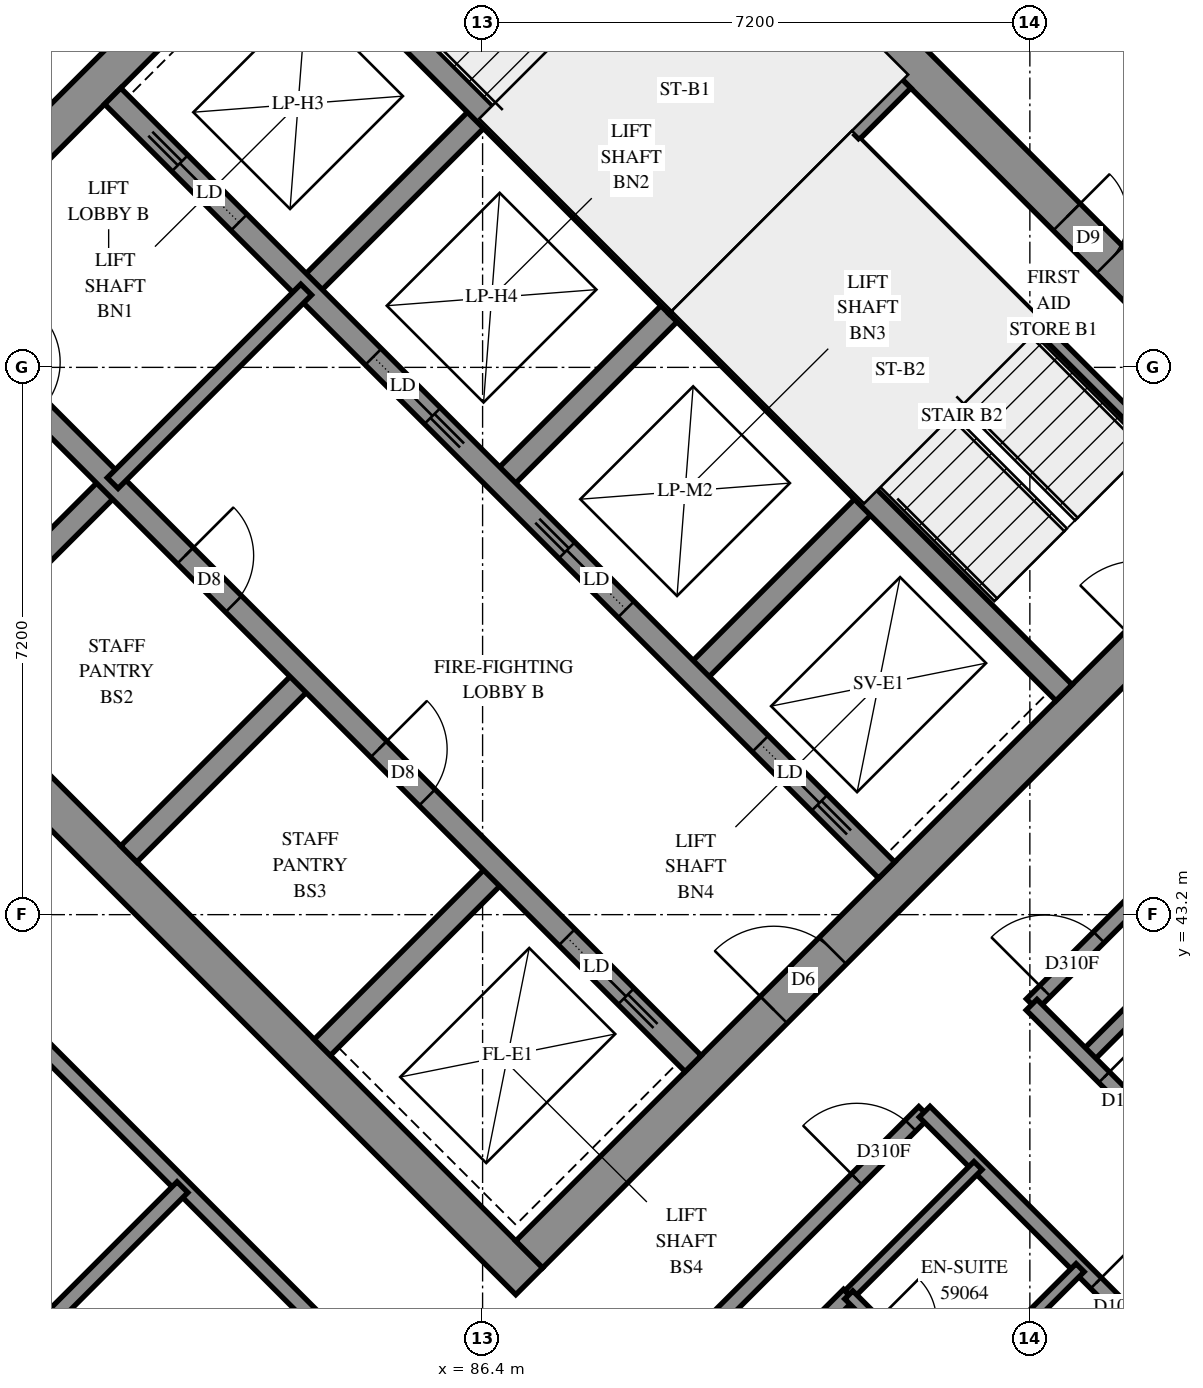
"""IFC4 building model, lengths in metres.
Left out: names, types, materials, properties, quantities, classifications, styles, units other than length and angle.
Written with IfcOpenShell. Run it as: python <this file> out.ifc"""

import sys

from ifc_helpers import new_model, si_unit, direction, frame, frame_2d, origin, place, context, subcontext, project, spatial, rectangle, extrude, element, fill, save


model = new_model("IFC4")
c1 = context("Model", 3, precision=1e-05, world=origin(), true_north=direction((0.0, 1.0)))
c2 = subcontext(c1, "Body", "Model", "MODEL_VIEW")
j1 = project(units=[si_unit("LENGTHUNIT", "METRE"), si_unit("PLANEANGLEUNIT", "RADIAN")], contexts=[c1])
p1 = place(None, origin())
s1 = spatial("IfcSite", under=j1, at=p1, CompositionType="ELEMENT")
p2 = place(p1, origin())
s2 = spatial("IfcBuilding", under=s1, at=p2, CompositionType="ELEMENT")
p3 = place(p2, frame((0.0, 0.0, 216.8)))
s3 = spatial("IfcBuildingStorey", under=s2, at=p3, CompositionType="ELEMENT", Elevation=216.8)
p4 = place(p3, frame((76.124, 49.267, -0.3), z_axis=(0.0, 0.0, 1.0), x_axis=(0.7071067812, -0.7071067812, 0.0)))
e1 = element("IfcWall", 1, at=p4, inside=s3, PredefinedType="SHEAR", context=c2, shape_type="SweptSolid", body=[
    extrude(rectangle(XDim=15.4, YDim=0.5, at=frame_2d((7.7, 0.0))), origin(), (0.0, 0.0, 1.0), 2.7),
])
p5 = place(p3, frame((86.66, 59.802, -0.3), z_axis=(0.0, 0.0, 1.0), x_axis=(0.7071067812, -0.7071067812, 0.0)))
e2 = element("IfcWall", 2, at=p5, inside=s3, PredefinedType="SHEAR", context=c2, shape_type="SweptSolid", body=[
    extrude(rectangle(XDim=15.4, YDim=0.5, at=frame_2d((7.7, 0.0))), origin(), (0.0, 0.0, 1.0), 2.7),
])
p6 = place(p5, frame((10.5, 0.0, 0.3)))
e3 = element("IfcOpeningElement", 3, at=p6, cuts=e2, PredefinedType="OPENING", context=c2, shape_type="SweptSolid", body=[
    extrude(rectangle(XDim=0.8, YDim=2.1, at=frame_2d((0.4, 1.05))), frame((0.0, 0.26, 0.0), z_axis=(0.0, -1.0, 0.0), x_axis=(1.0, 0.0, 0.0)), (0.0, 0.0, 1.0), 0.52),
])
p7 = place(p3, frame((76.478, 49.267, -0.3), z_axis=(0.0, 0.0, 1.0), x_axis=(0.7071067812, 0.7071067812, 0.0)))
e4 = element("IfcWall", 4, at=p7, inside=s3, PredefinedType="SHEAR", context=c2, shape_type="SweptSolid", body=[
    extrude(rectangle(XDim=14.4, YDim=0.5, at=frame_2d((7.2, 0.0))), origin(), (0.0, 0.0, 1.0), 2.7),
])
p8 = place(p7, frame((4.55, 0.0, 0.3)))
e5 = element("IfcOpeningElement", 5, at=p8, cuts=e4, PredefinedType="OPENING", context=c2, shape_type="SweptSolid", body=[
    extrude(rectangle(XDim=1.1, YDim=2.1, at=frame_2d((0.55, 1.05))), frame((0.0, 0.26, 0.0), z_axis=(0.0, -1.0, 0.0), x_axis=(1.0, 0.0, 0.0)), (0.0, 0.0, 1.0), 0.52),
])
p9 = place(p7, frame((11.35, 0.0, 0.3)))
e6 = element("IfcOpeningElement", 6, at=p9, cuts=e4, PredefinedType="OPENING", context=c2, shape_type="SweptSolid", body=[
    extrude(rectangle(XDim=1.1, YDim=2.1, at=frame_2d((0.55, 1.05))), frame((0.0, 0.26, 0.0), z_axis=(0.0, -1.0, 0.0), x_axis=(1.0, 0.0, 0.0)), (0.0, 0.0, 1.0), 0.52),
])
p10 = place(p3, frame((87.013, 38.731, -0.3), z_axis=(0.0, 0.0, 1.0), x_axis=(0.7071067812, 0.7071067812, 0.0)))
e7 = element("IfcWall", 7, at=p10, inside=s3, PredefinedType="SHEAR", context=c2, shape_type="SweptSolid", body=[
    extrude(rectangle(XDim=14.4, YDim=0.5, at=frame_2d((7.2, 0.0))), origin(), (0.0, 0.0, 1.0), 2.7),
])
p11 = place(p10, frame((4.55, 0.0, 0.3)))
e8 = element("IfcOpeningElement", 8, at=p11, cuts=e7, PredefinedType="OPENING", context=c2, shape_type="SweptSolid", body=[
    extrude(rectangle(XDim=1.1, YDim=2.1, at=frame_2d((0.55, 1.05))), frame((0.0, 0.26, 0.0), z_axis=(0.0, -1.0, 0.0), x_axis=(1.0, 0.0, 0.0)), (0.0, 0.0, 1.0), 0.52),
])
p12 = place(p10, frame((11.35, 0.0, 0.3)))
e9 = element("IfcOpeningElement", 9, at=p12, cuts=e7, PredefinedType="OPENING", context=c2, shape_type="SweptSolid", body=[
    extrude(rectangle(XDim=1.1, YDim=2.1, at=frame_2d((0.55, 1.05))), frame((0.0, 0.26, 0.0), z_axis=(0.0, -1.0, 0.0), x_axis=(1.0, 0.0, 0.0)), (0.0, 0.0, 1.0), 0.52),
])
for number, where, z_axis, x_axis in (
    (10, (79.2, 46.544, 0.0), (0.0, 0.0, 1.0), (0.707, 0.707, 0.0)),
    (11, (84.079, 51.423, 0.0), (0.0, 0.0, 1.0), (0.707, 0.707, 0.0)),
):
    element("IfcWall", number, at=place(p3, frame(where, z_axis=z_axis, x_axis=x_axis)), inside=s3, PredefinedType="SOLIDWALL", context=c2, shape_type="SweptSolid", body=[
        extrude(rectangle(XDim=3.3, YDim=0.3, at=frame_2d((1.65, 0.0))), origin(), (0.0, 0.0, 1.0), 3.1),
    ])
p13 = place(p3, frame((81.746, 43.999, 0.0), z_axis=(0.0, 0.0, 1.0), x_axis=(0.7071067812, 0.7071067812, 0.0)))
e12 = element("IfcWall", 12, at=p13, inside=s3, PredefinedType="SOLIDWALL", context=c2, shape_type="SweptSolid", body=[
    extrude(rectangle(XDim=3.3, YDim=0.3, at=frame_2d((1.65, 0.0))), origin(), (0.0, 0.0, 1.0), 3.1),
])
p14 = place(p3, frame((86.625, 48.878, 0.0), z_axis=(0.0, 0.0, 1.0), x_axis=(0.7071067812, 0.7071067812, 0.0)))
e13 = element("IfcWall", 13, at=p14, inside=s3, PredefinedType="SOLIDWALL", context=c2, shape_type="SweptSolid", body=[
    extrude(rectangle(XDim=3.3, YDim=0.3, at=frame_2d((1.65, 0.0))), origin(), (0.0, 0.0, 1.0), 3.1),
])
p15 = place(p3, frame((84.291, 41.453, 0.0), z_axis=(0.0, 0.0, 1.0), x_axis=(0.7071067812, 0.7071067812, 0.0)))
e14 = element("IfcWall", 14, at=p15, inside=s3, PredefinedType="SOLIDWALL", context=c2, shape_type="SweptSolid", body=[
    extrude(rectangle(XDim=3.3, YDim=0.3, at=frame_2d((1.65, 0.0))), origin(), (0.0, 0.0, 1.0), 3.1),
])
p16 = place(p3, frame((89.17, 46.332, 0.0), z_axis=(0.0, 0.0, 1.0), x_axis=(0.7071067812, 0.7071067812, 0.0)))
e15 = element("IfcWall", 15, at=p16, inside=s3, PredefinedType="SOLIDWALL", context=c2, shape_type="SweptSolid", body=[
    extrude(rectangle(XDim=3.3, YDim=0.3, at=frame_2d((1.65, 0.0))), origin(), (0.0, 0.0, 1.0), 3.1),
])
p17 = place(p3, frame((78.988, 51.423, 0.0), z_axis=(0.0, 0.0, 1.0), x_axis=(0.7071067812, -0.7071067812, 0.0)))
e16 = element("IfcWall", 16, at=p17, inside=s3, PredefinedType="SOLIDWALL", context=c2, shape_type="SweptSolid", body=[
    extrude(rectangle(XDim=14.4, YDim=0.3, at=frame_2d((7.2, 0.0))), origin(), (0.0, 0.0, 1.0), 3.1),
])
p18 = place(p17, frame((1.35, 0.0, 0.0)))
e17 = element("IfcOpeningElement", 17, at=p18, cuts=e16, PredefinedType="OPENING", context=c2, shape_type="SweptSolid", body=[
    extrude(rectangle(XDim=0.9, YDim=2.1, at=frame_2d((0.45, 1.05))), frame((0.0, 0.16, 0.0), z_axis=(0.0, -1.0, 0.0), x_axis=(1.0, 0.0, 0.0)), (0.0, 0.0, 1.0), 0.32),
])
p19 = place(p17, frame((4.95, 0.0, 0.0)))
e18 = element("IfcOpeningElement", 18, at=p19, cuts=e16, PredefinedType="OPENING", context=c2, shape_type="SweptSolid", body=[
    extrude(rectangle(XDim=0.9, YDim=2.1, at=frame_2d((0.45, 1.05))), frame((0.0, 0.16, 0.0), z_axis=(0.0, -1.0, 0.0), x_axis=(1.0, 0.0, 0.0)), (0.0, 0.0, 1.0), 0.32),
])
p20 = place(p17, frame((8.55, 0.0, 0.0)))
e19 = element("IfcOpeningElement", 19, at=p20, cuts=e16, PredefinedType="OPENING", context=c2, shape_type="SweptSolid", body=[
    extrude(rectangle(XDim=0.9, YDim=2.1, at=frame_2d((0.45, 1.05))), frame((0.0, 0.16, 0.0), z_axis=(0.0, -1.0, 0.0), x_axis=(1.0, 0.0, 0.0)), (0.0, 0.0, 1.0), 0.32),
])
p21 = place(p17, frame((12.05, 0.0, 0.0)))
e20 = element("IfcOpeningElement", 20, at=p21, cuts=e16, PredefinedType="OPENING", context=c2, shape_type="SweptSolid", body=[
    extrude(rectangle(XDim=1.1, YDim=2.1, at=frame_2d((0.55, 1.05))), frame((0.0, 0.16, 0.0), z_axis=(0.0, -1.0, 0.0), x_axis=(1.0, 0.0, 0.0)), (0.0, 0.0, 1.0), 0.32),
])
p22 = place(p3, frame((81.534, 53.969, 0.0), z_axis=(0.0, 0.0, 1.0), x_axis=(0.707103309, -0.7071102534, 0.0)))
e21 = element("IfcWall", 21, at=p22, inside=s3, PredefinedType="SOLIDWALL", context=c2, shape_type="SweptSolid", body=[
    extrude(rectangle(XDim=14.4, YDim=0.3, at=frame_2d((7.2, 0.0))), origin(), (0.0, 0.0, 1.0), 3.1),
])
p23 = place(p22, frame((1.25, 0.0, 0.0)))
e22 = element("IfcOpeningElement", 22, at=p23, cuts=e21, PredefinedType="OPENING", context=c2, shape_type="SweptSolid", body=[
    extrude(rectangle(XDim=1.1, YDim=2.1, at=frame_2d((0.55, 1.05))), frame((0.0, 0.16, 0.0), z_axis=(0.0, -1.0, 0.0), x_axis=(1.0, 0.0, 0.0)), (0.0, 0.0, 1.0), 0.32),
])
p24 = place(p22, frame((4.85, 0.0, 0.0)))
e23 = element("IfcOpeningElement", 23, at=p24, cuts=e21, PredefinedType="OPENING", context=c2, shape_type="SweptSolid", body=[
    extrude(rectangle(XDim=1.1, YDim=2.1, at=frame_2d((0.55, 1.05))), frame((0.0, 0.16, 0.0), z_axis=(0.0, -1.0, 0.0), x_axis=(1.0, 0.0, 0.0)), (0.0, 0.0, 1.0), 0.32),
])
p25 = place(p22, frame((8.45, 0.0, 0.0)))
e24 = element("IfcOpeningElement", 24, at=p25, cuts=e21, PredefinedType="OPENING", context=c2, shape_type="SweptSolid", body=[
    extrude(rectangle(XDim=1.1, YDim=2.1, at=frame_2d((0.55, 1.05))), frame((0.0, 0.16, 0.0), z_axis=(0.0, -1.0, 0.0), x_axis=(1.0, 0.0, 0.0)), (0.0, 0.0, 1.0), 0.32),
])
p26 = place(p22, frame((12.05, 0.0, 0.0)))
e25 = element("IfcOpeningElement", 25, at=p26, cuts=e21, PredefinedType="OPENING", context=c2, shape_type="SweptSolid", body=[
    extrude(rectangle(XDim=1.1, YDim=2.1, at=frame_2d((0.55, 1.05))), frame((0.0, 0.16, 0.0), z_axis=(0.0, -1.0, 0.0), x_axis=(1.0, 0.0, 0.0)), (0.0, 0.0, 1.0), 0.32),
])
for number, where, z_axis, x_axis in (
    (26, (83.867, 56.302, 0.0), (0.0, 0.0, 1.0), (0.707, -0.707, 0.0)),
    (27, (88.958, 51.211, 0.0), (0.0, 0.0, 1.0), (0.707, -0.707, 0.0)),
):
    element("IfcWall", number, at=place(p3, frame(where, z_axis=z_axis, x_axis=x_axis)), inside=s3, PredefinedType="SOLIDWALL", context=c2, shape_type="SweptSolid", body=[
        extrude(rectangle(XDim=7.2, YDim=0.3, at=frame_2d((3.6, 0.0))), origin(), (0.0, 0.0, 1.0), 3.1),
    ])
p27 = place(p3, frame((88.958, 51.211, 0.0), z_axis=(0.0, 0.0, 1.0), x_axis=(0.7071067812, 0.7071067812, 0.0)))
e28 = element("IfcWall", 28, at=p27, inside=s3, PredefinedType="SOLIDWALL", context=c2, shape_type="SweptSolid", body=[
    extrude(rectangle(XDim=4.2, YDim=0.3, at=frame_2d((2.1, 0.0))), origin(), (0.0, 0.0, 1.0), 3.1),
])
p28 = place(p3, frame((91.313, 53.354, 0.0), z_axis=(0.0, 0.0, 1.0), x_axis=(0.7071147811, -0.7070987812, 0.0)))
e29 = element("IfcWall", 29, at=p28, inside=s3, PredefinedType="PARTITIONING", context=c2, shape_type="SweptSolid", body=[
    extrude(rectangle(XDim=6.25, YDim=0.15, at=frame_2d((3.125, 0.0))), origin(), (0.0, 0.0, 1.0), 3.1),
])
p29 = place(p3, frame((81.534, 48.878, 0.0), z_axis=(0.0, 0.0, 1.0), x_axis=(0.707092892, 0.7071206701, 0.0)))
e30 = element("IfcWall", 30, at=p29, inside=s3, PredefinedType="PARTITIONING", context=c2, shape_type="SweptSolid", body=[
    extrude(rectangle(XDim=3.6, YDim=0.2, at=frame_2d((1.8, 0.0))), origin(), (0.0, 0.0, 1.0), 3.1),
])
p30 = place(p3, frame((93.625, 42.021, 0.0), z_axis=(0.0, 0.0, 1.0), x_axis=(0.7071067812, 0.7071067812, 0.0)))
e31 = element("IfcWall", 31, at=p30, inside=s3, PredefinedType="PARTITIONING", context=c2, shape_type="SweptSolid", body=[
    extrude(rectangle(XDim=9.998, YDim=0.2, at=frame_2d((4.999, 0.0))), origin(), (0.0, 0.0, 1.0), 3.1),
])
p31 = place(p30, frame((0.248, 0.0, 0.0)))
e32 = element("IfcOpeningElement", 32, at=p31, cuts=e31, PredefinedType="OPENING", context=c2, shape_type="SweptSolid", body=[
    extrude(rectangle(XDim=1.0, YDim=2.1, at=frame_2d((0.5, 1.05))), frame((0.0, 0.11, 0.0), z_axis=(0.0, -1.0, 0.0), x_axis=(1.0, 0.0, 0.0)), (0.0, 0.0, 1.0), 0.22),
])
p32 = place(p3, frame((85.01, 31.992, 0.0), z_axis=(0.0, 0.0, 1.0), x_axis=(0.7071010869, 0.7071124754, 0.0)))
e33 = element("IfcWall", 33, at=p32, inside=s3, PredefinedType="PARTITIONING", context=c2, shape_type="SweptSolid", body=[
    extrude(rectangle(XDim=8.781, YDim=0.2, at=frame_2d((4.39, 0.0))), origin(), (0.0, 0.0, 1.0), 3.1),
])
p33 = place(p3, frame((86.835, 35.231, 0.0), z_axis=(0.0, 0.0, 1.0), x_axis=(0.7071067812, 0.7071067812, 0.0)))
e34 = element("IfcWall", 34, at=p33, inside=s3, PredefinedType="PARTITIONING", context=c2, shape_type="SweptSolid", body=[
    extrude(rectangle(XDim=7.6, YDim=0.2, at=frame_2d((3.8, 0.0))), origin(), (0.0, 0.0, 1.0), 3.1),
])
p34 = place(p33, frame((6.346, 0.0, 0.0)))
e35 = element("IfcOpeningElement", 35, at=p34, cuts=e34, PredefinedType="OPENING", context=c2, shape_type="SweptSolid", body=[
    extrude(rectangle(XDim=1.0, YDim=2.1, at=frame_2d((0.5, 1.05))), frame((0.0, 0.11, 0.0), z_axis=(0.0, -1.0, 0.0), x_axis=(1.0, 0.0, 0.0)), (0.0, 0.0, 1.0), 0.22),
])
p35 = place(p3, frame((94.331, 41.313, 0.0), z_axis=(0.0, 0.0, 1.0), x_axis=(0.7072516979, 0.7069618347, 0.0)))
e36 = element("IfcWall", 36, at=p35, inside=s3, PredefinedType="PARTITIONING", context=c2, shape_type="SweptSolid", body=[
    extrude(rectangle(XDim=6.9, YDim=0.2, at=frame_2d((3.45, 0.0))), origin(), (0.0, 0.0, 1.0), 3.1),
])
p36 = place(p3, frame((80.522, 41.553, 0.0), z_axis=(0.0, 0.0, 1.0), x_axis=(0.7071067812, -0.7071067812, 0.0)))
e37 = element("IfcWall", 37, at=p36, inside=s3, PredefinedType="PARTITIONING", context=c2, shape_type="SweptSolid", body=[
    extrude(rectangle(XDim=6.836, YDim=0.2, at=frame_2d((3.418, 0.0))), origin(), (0.0, 0.0, 1.0), 3.1),
])
p37 = place(p3, frame((93.623, 42.015, 0.0), z_axis=(0.0, 0.0, 1.0), x_axis=(0.7071067812, -0.7071067812, 0.0)))
e38 = element("IfcWall", 38, at=p37, inside=s3, PredefinedType="PARTITIONING", context=c2, shape_type="SweptSolid", body=[
    extrude(rectangle(XDim=4.599, YDim=0.2, at=frame_2d((2.3, 0.0))), origin(), (0.0, 0.0, 1.0), 3.1),
])
p38 = place(p37, frame((1.349, 0.0, 0.0)))
e39 = element("IfcOpeningElement", 39, at=p38, cuts=e38, PredefinedType="OPENING", context=c2, shape_type="SweptSolid", body=[
    extrude(rectangle(XDim=0.9, YDim=2.1, at=frame_2d((0.45, 1.05))), frame((0.0, 0.11, 0.0), z_axis=(0.0, -1.0, 0.0), x_axis=(1.0, 0.0, 0.0)), (0.0, 0.0, 1.0), 0.22),
])
p39 = place(p3, frame((92.216, 40.608, 0.0), z_axis=(0.0, 0.0, 1.0), x_axis=(0.7071067812, -0.7071067812, 0.0)))
e40 = element("IfcWall", 40, at=p39, inside=s3, PredefinedType="PARTITIONING", context=c2, shape_type="SweptSolid", body=[
    extrude(rectangle(XDim=4.599, YDim=0.2, at=frame_2d((2.3, 0.0))), origin(), (0.0, 0.0, 1.0), 3.1),
])
p40 = place(p39, frame((3.189, 0.0, 0.0)))
e41 = element("IfcOpeningElement", 41, at=p40, cuts=e40, PredefinedType="OPENING", context=c2, shape_type="SweptSolid", body=[
    extrude(rectangle(XDim=0.9, YDim=2.1, at=frame_2d((0.45, 1.05))), frame((0.0, 0.11, 0.0), z_axis=(0.0, -1.0, 0.0), x_axis=(1.0, 0.0, 0.0)), (0.0, 0.0, 1.0), 0.22),
])
p41 = place(p3, frame((79.626, 36.789, 0.0), z_axis=(0.0, 0.0, 1.0), x_axis=(0.7071067812, 0.7071067812, 0.0)))
e42 = element("IfcWall", 42, at=p41, inside=s3, PredefinedType="PARTITIONING", context=c2, shape_type="SweptSolid", body=[
    extrude(rectangle(XDim=3.996, YDim=0.2, at=frame_2d((1.998, 0.0))), origin(), (0.0, 0.0, 1.0), 3.1),
])
for number, where, z_axis, x_axis in (
    (43, (92.563, 36.857, 0.0), (0.0, 0.0, 1.0), (0.707, 0.707, 0.0)),
    (44, (91.219, 38.201, 0.0), (0.0, 0.0, 1.0), (0.707, 0.707, 0.0)),
):
    element("IfcWall", number, at=place(p3, frame(where, z_axis=z_axis, x_axis=x_axis)), inside=s3, PredefinedType="PARTITIONING", context=c2, shape_type="SweptSolid", body=[
        extrude(rectangle(XDim=2.401, YDim=0.15, at=frame_2d((1.201, 0.0))), origin(), (0.0, 0.0, 1.0), 3.1),
    ])
p42 = place(p3, frame((91.217, 38.197, 0.0), z_axis=(0.0, 0.0, 1.0), x_axis=(0.7071067812, -0.7071067812, 0.0)))
e45 = element("IfcWall", 45, at=p42, inside=s3, PredefinedType="PARTITIONING", context=c2, shape_type="SweptSolid", body=[
    extrude(rectangle(XDim=1.901, YDim=0.15, at=frame_2d((0.95, 0.0))), origin(), (0.0, 0.0, 1.0), 3.1),
])
p43 = place(p42, frame((0.502, 0.0, 0.0)))
e46 = element("IfcOpeningElement", 46, at=p43, cuts=e45, PredefinedType="OPENING", context=c2, shape_type="SweptSolid", body=[
    extrude(rectangle(XDim=0.8, YDim=2.1, at=frame_2d((0.4, 1.05))), frame((0.0, 0.085, 0.0), z_axis=(0.0, -1.0, 0.0), x_axis=(1.0, 0.0, 0.0)), (0.0, 0.0, 1.0), 0.17),
])
p44 = place(p6, origin())
e47 = element("IfcDoor", 47, at=p44, inside=s3, OperationType="SINGLE_SWING_RIGHT", PredefinedType="DOOR", context=c2, shape_type="SweptSolid", body=[
    extrude(rectangle(XDim=0.8, YDim=2.1, at=frame_2d((0.4, 1.05))), frame((0.0, 0.025, 0.0), z_axis=(0.0, -1.0, 0.0), x_axis=(1.0, 0.0, 0.0)), (0.0, 0.0, 1.0), 0.05),
])
fill(e3, e47)
p45 = place(p11, origin())
e48 = element("IfcDoor", 48, at=p45, inside=s3, OperationType="DOUBLE_DOOR_SINGLE_SWING", PredefinedType="DOOR", context=c2, shape_type="SweptSolid", body=[
    extrude(rectangle(XDim=1.1, YDim=2.1, at=frame_2d((0.55, 1.05))), frame((0.0, 0.025, 0.0), z_axis=(0.0, -1.0, 0.0), x_axis=(1.0, 0.0, 0.0)), (0.0, 0.0, 1.0), 0.05),
])
fill(e8, e48)
p46 = place(p19, origin())
e49 = element("IfcDoor", 49, at=p46, inside=s3, OperationType="SINGLE_SWING_LEFT", PredefinedType="DOOR", context=c2, shape_type="SweptSolid", body=[
    extrude(rectangle(XDim=0.9, YDim=2.1, at=frame_2d((0.45, 1.05))), frame((0.0, 0.025, 0.0), z_axis=(0.0, -1.0, 0.0), x_axis=(1.0, 0.0, 0.0)), (0.0, 0.0, 1.0), 0.05),
])
fill(e18, e49)
p47 = place(p20, origin())
e50 = element("IfcDoor", 50, at=p47, inside=s3, OperationType="SINGLE_SWING_LEFT", PredefinedType="DOOR", context=c2, shape_type="SweptSolid", body=[
    extrude(rectangle(XDim=0.9, YDim=2.1, at=frame_2d((0.45, 1.05))), frame((0.0, 0.025, 0.0), z_axis=(0.0, -1.0, 0.0), x_axis=(1.0, 0.0, 0.0)), (0.0, 0.0, 1.0), 0.05),
])
fill(e19, e50)
p48 = place(p21, origin())
e51 = element("IfcDoor", 51, at=p48, inside=s3, OperationType="SLIDING_TO_RIGHT", PredefinedType="DOOR", context=c2, shape_type="SweptSolid", body=[
    extrude(rectangle(XDim=1.1, YDim=2.1, at=frame_2d((0.55, 1.05))), frame((0.0, 0.025, 0.0), z_axis=(0.0, -1.0, 0.0), x_axis=(1.0, 0.0, 0.0)), (0.0, 0.0, 1.0), 0.05),
])
fill(e20, e51)
p49 = place(p23, origin())
e52 = element("IfcDoor", 52, at=p49, inside=s3, OperationType="SLIDING_TO_LEFT", PredefinedType="DOOR", context=c2, shape_type="SweptSolid", body=[
    extrude(rectangle(XDim=1.1, YDim=2.1, at=frame_2d((0.55, 1.05))), frame((0.0, 0.025, 0.0), z_axis=(0.0, -1.0, 0.0), x_axis=(1.0, 0.0, 0.0)), (0.0, 0.0, 1.0), 0.05),
])
fill(e22, e52)
p50 = place(p24, origin())
e53 = element("IfcDoor", 53, at=p50, inside=s3, OperationType="SLIDING_TO_RIGHT", PredefinedType="DOOR", context=c2, shape_type="SweptSolid", body=[
    extrude(rectangle(XDim=1.1, YDim=2.1, at=frame_2d((0.55, 1.05))), frame((0.0, 0.025, 0.0), z_axis=(0.0, -1.0, 0.0), x_axis=(1.0, 0.0, 0.0)), (0.0, 0.0, 1.0), 0.05),
])
fill(e23, e53)
p51 = place(p25, origin())
e54 = element("IfcDoor", 54, at=p51, inside=s3, OperationType="SLIDING_TO_LEFT", PredefinedType="DOOR", context=c2, shape_type="SweptSolid", body=[
    extrude(rectangle(XDim=1.1, YDim=2.1, at=frame_2d((0.55, 1.05))), frame((0.0, 0.025, 0.0), z_axis=(0.0, -1.0, 0.0), x_axis=(1.0, 0.0, 0.0)), (0.0, 0.0, 1.0), 0.05),
])
fill(e24, e54)
p52 = place(p26, origin())
e55 = element("IfcDoor", 55, at=p52, inside=s3, OperationType="SLIDING_TO_RIGHT", PredefinedType="DOOR", context=c2, shape_type="SweptSolid", body=[
    extrude(rectangle(XDim=1.1, YDim=2.1, at=frame_2d((0.55, 1.05))), frame((0.0, 0.025, 0.0), z_axis=(0.0, -1.0, 0.0), x_axis=(1.0, 0.0, 0.0)), (0.0, 0.0, 1.0), 0.05),
])
fill(e25, e55)
p53 = place(p31, origin())
e56 = element("IfcDoor", 56, at=p53, inside=s3, OperationType="SINGLE_SWING_LEFT", PredefinedType="DOOR", context=c2, shape_type="SweptSolid", body=[
    extrude(rectangle(XDim=1.0, YDim=2.1, at=frame_2d((0.5, 1.05))), frame((0.0, 0.025, 0.0), z_axis=(0.0, -1.0, 0.0), x_axis=(1.0, 0.0, 0.0)), (0.0, 0.0, 1.0), 0.05),
])
fill(e32, e56)
p54 = place(p34, origin())
e57 = element("IfcDoor", 57, at=p54, inside=s3, OperationType="SINGLE_SWING_RIGHT", PredefinedType="DOOR", context=c2, shape_type="SweptSolid", body=[
    extrude(rectangle(XDim=1.0, YDim=2.1, at=frame_2d((0.5, 1.05))), frame((0.0, 0.025, 0.0), z_axis=(0.0, -1.0, 0.0), x_axis=(1.0, 0.0, 0.0)), (0.0, 0.0, 1.0), 0.05),
])
fill(e35, e57)
p55 = place(p38, origin())
e58 = element("IfcDoor", 58, at=p55, inside=s3, OperationType="SINGLE_SWING_RIGHT", PredefinedType="DOOR", context=c2, shape_type="SweptSolid", body=[
    extrude(rectangle(XDim=0.9, YDim=2.1, at=frame_2d((0.45, 1.05))), frame((0.0, 0.025, 0.0), z_axis=(0.0, -1.0, 0.0), x_axis=(1.0, 0.0, 0.0)), (0.0, 0.0, 1.0), 0.05),
])
fill(e39, e58)
p56 = place(p40, origin())
e59 = element("IfcDoor", 59, at=p56, inside=s3, OperationType="SINGLE_SWING_LEFT", PredefinedType="DOOR", context=c2, shape_type="SweptSolid", body=[
    extrude(rectangle(XDim=0.9, YDim=2.1, at=frame_2d((0.45, 1.05))), frame((0.0, 0.025, 0.0), z_axis=(0.0, -1.0, 0.0), x_axis=(1.0, 0.0, 0.0)), (0.0, 0.0, 1.0), 0.05),
])
fill(e41, e59)
save(model, sys.argv[1])
